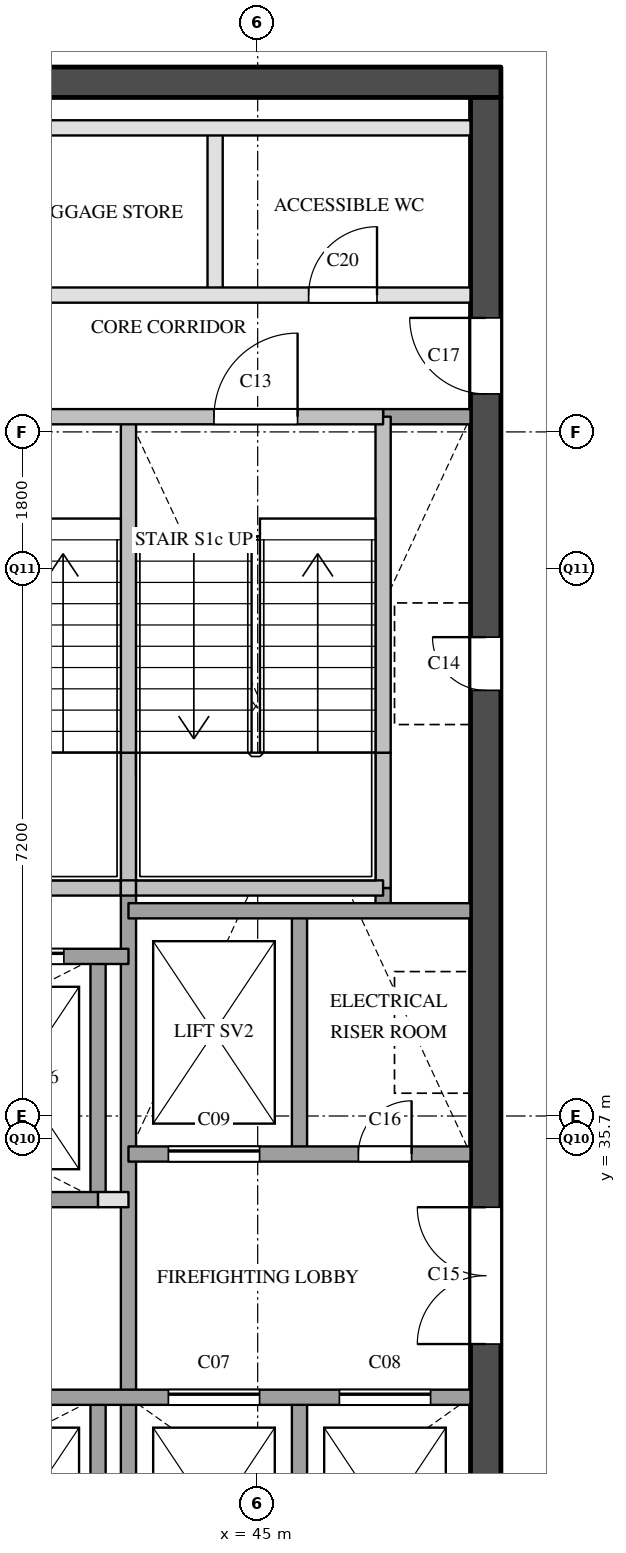
"""IFC4 building model, lengths in metres.
Left out: names, types, materials, properties, quantities, classifications, styles, units other than length and angle.
Written with IfcOpenShell. Run it as: python <this file> out.ifc"""

import sys

from ifc_helpers import new_model, si_unit, direction, frame, frame_2d, origin, place, context, subcontext, project, spatial, rectangle, extrude, element, fill, save


model = new_model("IFC4")
c1 = context("Model", 3, precision=1e-05, world=origin(), true_north=direction((0.0, 1.0)))
c2 = subcontext(c1, "Body", "Model", "MODEL_VIEW")
j1 = project(units=[si_unit("LENGTHUNIT", "METRE"), si_unit("PLANEANGLEUNIT", "RADIAN")], contexts=[c1])
p1 = place(None, origin())
s1 = spatial("IfcSite", under=j1, at=p1, CompositionType="ELEMENT")
p2 = place(p1, origin())
s2 = spatial("IfcBuilding", under=s1, at=p2, CompositionType="ELEMENT")
p3 = place(p2, frame((0.0, 0.0, 226.7)))
s3 = spatial("IfcBuildingStorey", under=s2, at=p3, CompositionType="ELEMENT", Elevation=226.7)
p4 = place(p3, frame((36.2, 49.6, 0.0), z_axis=(0.0, 0.0, 1.0), x_axis=(1.0, 0.0, 0.0)))
e1 = element("IfcWall", 1, at=p4, inside=s3, PredefinedType="SHEAR", context=c2, shape_type="SweptSolid", body=[
    extrude(rectangle(XDim=12.0, YDim=0.4, at=frame_2d((6.0, 0.0))), origin(), (0.0, 0.0, 1.0), 3.5),
])
p5 = place(p3, frame((48.0, 29.1, 0.0), z_axis=(0.0, 0.0, 1.0), x_axis=(0.0, 1.0, 0.0)))
e2 = element("IfcWall", 2, at=p5, inside=s3, PredefinedType="SHEAR", context=c2, shape_type="SweptSolid", body=[
    extrude(rectangle(XDim=20.3, YDim=0.4, at=frame_2d((10.15, 0.0))), origin(), (0.0, 0.0, 1.0), 3.5),
])
p6 = place(p5, frame((12.5, 0.0, 0.0)))
e3 = element("IfcOpeningElement", 3, at=p6, cuts=e2, PredefinedType="OPENING", context=c2, shape_type="SweptSolid", body=[
    extrude(rectangle(XDim=0.7, YDim=2.1, at=frame_2d((0.35, 1.05))), frame((0.0, 0.21, 0.0), z_axis=(0.0, -1.0, 0.0), x_axis=(1.0, 0.0, 0.0)), (0.0, 0.0, 1.0), 0.42),
])
p7 = place(p5, frame((3.9, 0.0, 0.0)))
e4 = element("IfcOpeningElement", 4, at=p7, cuts=e2, PredefinedType="OPENING", context=c2, shape_type="SweptSolid", body=[
    extrude(rectangle(XDim=1.8, YDim=2.1, at=frame_2d((0.9, 1.05))), frame((0.0, 0.21, 0.0), z_axis=(0.0, -1.0, 0.0), x_axis=(1.0, 0.0, 0.0)), (0.0, 0.0, 1.0), 0.42),
])
p8 = place(p5, frame((16.4, 0.0, 0.0)))
e5 = element("IfcOpeningElement", 5, at=p8, cuts=e2, PredefinedType="OPENING", context=c2, shape_type="SweptSolid", body=[
    extrude(rectangle(XDim=1.0, YDim=2.1, at=frame_2d((0.5, 1.05))), frame((0.0, 0.21, 0.0), z_axis=(0.0, -1.0, 0.0), x_axis=(1.0, 0.0, 0.0)), (0.0, 0.0, 1.0), 0.42),
])
p9 = place(p3, frame((42.9, 29.1, 0.0), z_axis=(0.0, 0.0, 1.0), x_axis=(0.0, 1.0, 0.0)))
e6 = element("IfcWall", 6, at=p9, inside=s3, PredefinedType="SOLIDWALL", context=c2, shape_type="SweptSolid", body=[
    extrude(rectangle(XDim=3.2, YDim=0.2, at=frame_2d((1.6, 0.0))), origin(), (0.0, 0.0, 1.0), 3.5),
])
p10 = place(p3, frame((42.9, 34.9, 0.0), z_axis=(0.0, 0.0, 1.0), x_axis=(0.0, 1.0, 0.0)))
e7 = element("IfcWall", 7, at=p10, inside=s3, PredefinedType="SOLIDWALL", context=c2, shape_type="SweptSolid", body=[
    extrude(rectangle(XDim=3.2, YDim=0.2, at=frame_2d((1.6, 0.0))), origin(), (0.0, 0.0, 1.0), 3.5),
])
p11 = place(p3, frame((43.3, 29.1, 0.0), z_axis=(0.0, 0.0, 1.0), x_axis=(0.0, 1.0, 0.0)))
e8 = element("IfcWall", 8, at=p11, inside=s3, PredefinedType="SOLIDWALL", context=c2, shape_type="SweptSolid", body=[
    extrude(rectangle(XDim=9.9, YDim=0.2, at=frame_2d((4.95, 0.0))), origin(), (0.0, 0.0, 1.0), 3.5),
])
p12 = place(p3, frame((43.3, 39.0, 0.0), z_axis=(0.0, 0.0, 1.0), x_axis=(0.0, 1.0, 0.0)))
e9 = element("IfcWall", 9, at=p12, inside=s3, PredefinedType="SOLIDWALL", context=c2, shape_type="SweptSolid", body=[
    extrude(rectangle(XDim=1.78, YDim=0.2, at=frame_2d((0.89, 0.0))), origin(), (0.0, 0.0, 1.0), 3.5),
])
p13 = place(p3, frame((43.3, 40.78, 0.0), z_axis=(0.0, 0.0, 1.0), x_axis=(0.0, 1.0, 0.0)))
e10 = element("IfcWall", 10, at=p13, inside=s3, PredefinedType="SOLIDWALL", context=c2, shape_type="SweptSolid", body=[
    extrude(rectangle(XDim=4.42, YDim=0.2, at=frame_2d((2.21, 0.0))), origin(), (0.0, 0.0, 1.0), 3.5),
])
p14 = place(p3, frame((44.44, 46.8, 0.0), z_axis=(0.0, 0.0, 1.0), x_axis=(0.0, 1.0, 0.0)))
e11 = element("IfcWall", 11, at=p14, inside=s3, PredefinedType="PARTITIONING", context=c2, shape_type="SweptSolid", body=[
    extrude(rectangle(XDim=2.2, YDim=0.2, at=frame_2d((1.1, 0.0))), origin(), (0.0, 0.0, 1.0), 3.5),
])
for number, where, z_axis, x_axis in (
    (12, (45.55, 29.1, 0.0), (0.0, 0.0, 1.0), (0.0, 1.0, 0.0)),
    (13, (45.55, 35.5, 0.0), (0.0, 0.0, 1.0), (0.0, 1.0, 0.0)),
):
    element("IfcWall", number, at=place(p3, frame(where, z_axis=z_axis, x_axis=x_axis)), inside=s3, PredefinedType="SOLIDWALL", context=c2, shape_type="SweptSolid", body=[
        extrude(rectangle(XDim=3.2, YDim=0.2, at=frame_2d((1.6, 0.0))), origin(), (0.0, 0.0, 1.0), 3.5),
    ])
p15 = place(p3, frame((46.65, 38.7, 0.0), z_axis=(0.0, 0.0, 1.0), x_axis=(0.0, 1.0, 0.0)))
e14 = element("IfcWall", 14, at=p15, inside=s3, PredefinedType="SOLIDWALL", context=c2, shape_type="SweptSolid", body=[
    extrude(rectangle(XDim=0.3, YDim=0.2, at=frame_2d((0.15, 0.0))), origin(), (0.0, 0.0, 1.0), 3.5),
])
p16 = place(p3, frame((46.65, 39.0, 0.0), z_axis=(0.0, 0.0, 1.0), x_axis=(0.0, 1.0, 0.0)))
e15 = element("IfcWall", 15, at=p16, inside=s3, PredefinedType="SOLIDWALL", context=c2, shape_type="SweptSolid", body=[
    extrude(rectangle(XDim=1.78, YDim=0.2, at=frame_2d((0.89, 0.0))), origin(), (0.0, 0.0, 1.0), 3.5),
])
p17 = place(p3, frame((46.65, 40.78, 0.0), z_axis=(0.0, 0.0, 1.0), x_axis=(0.0, 1.0, 0.0)))
e16 = element("IfcWall", 16, at=p17, inside=s3, PredefinedType="SOLIDWALL", context=c2, shape_type="SweptSolid", body=[
    extrude(rectangle(XDim=4.42, YDim=0.2, at=frame_2d((2.21, 0.0))), origin(), (0.0, 0.0, 1.0), 3.5),
])
p18 = place(p3, frame((36.6, 32.3, 0.0), z_axis=(0.0, 0.0, 1.0), x_axis=(1.0, 0.0, 0.0)))
e17 = element("IfcWall", 17, at=p18, inside=s3, PredefinedType="SOLIDWALL", context=c2, shape_type="SweptSolid", body=[
    extrude(rectangle(XDim=11.2, YDim=0.2, at=frame_2d((5.6, 0.0))), origin(), (0.0, 0.0, 1.0), 3.5),
])
p19 = place(p18, frame((7.225, 0.0, 0.0)))
e18 = element("IfcOpeningElement", 18, at=p19, cuts=e17, PredefinedType="OPENING", context=c2, shape_type="SweptSolid", body=[
    extrude(rectangle(XDim=1.2, YDim=2.1, at=frame_2d((0.6, 1.05))), frame((0.0, 0.11, 0.0), z_axis=(0.0, -1.0, 0.0), x_axis=(1.0, 0.0, 0.0)), (0.0, 0.0, 1.0), 0.22),
])
p20 = place(p18, frame((9.475, 0.0, 0.0)))
e19 = element("IfcOpeningElement", 19, at=p20, cuts=e17, PredefinedType="OPENING", context=c2, shape_type="SweptSolid", body=[
    extrude(rectangle(XDim=1.2, YDim=2.1, at=frame_2d((0.6, 1.05))), frame((0.0, 0.11, 0.0), z_axis=(0.0, -1.0, 0.0), x_axis=(1.0, 0.0, 0.0)), (0.0, 0.0, 1.0), 0.22),
])
p21 = place(p3, frame((42.9, 34.9, 0.0), z_axis=(0.0, 0.0, 1.0), x_axis=(1.0, 0.0, 0.0)))
e20 = element("IfcWall", 20, at=p21, inside=s3, PredefinedType="PARTITIONING", context=c2, shape_type="SweptSolid", body=[
    extrude(rectangle(XDim=0.4, YDim=0.2, at=frame_2d((0.2, 0.0))), origin(), (0.0, 0.0, 1.0), 3.5),
])
p22 = place(p3, frame((36.6, 34.9, 0.0), z_axis=(0.0, 0.0, 1.0), x_axis=(1.0, 0.0, 0.0)))
e21 = element("IfcWall", 21, at=p22, inside=s3, PredefinedType="SOLIDWALL", context=c2, shape_type="SweptSolid", body=[
    extrude(rectangle(XDim=6.3, YDim=0.2, at=frame_2d((3.15, 0.0))), origin(), (0.0, 0.0, 1.0), 3.5),
])
p23 = place(p3, frame((43.3, 35.5, 0.0), z_axis=(0.0, 0.0, 1.0), x_axis=(1.0, 0.0, 0.0)))
e22 = element("IfcWall", 22, at=p23, inside=s3, PredefinedType="SOLIDWALL", context=c2, shape_type="SweptSolid", body=[
    extrude(rectangle(XDim=4.5, YDim=0.2, at=frame_2d((2.25, 0.0))), origin(), (0.0, 0.0, 1.0), 3.5),
])
p24 = place(p23, frame((0.525, 0.0, 0.0)))
e23 = element("IfcOpeningElement", 23, at=p24, cuts=e22, PredefinedType="OPENING", context=c2, shape_type="SweptSolid", body=[
    extrude(rectangle(XDim=1.2, YDim=2.1, at=frame_2d((0.6, 1.05))), frame((0.0, 0.11, 0.0), z_axis=(0.0, -1.0, 0.0), x_axis=(1.0, 0.0, 0.0)), (0.0, 0.0, 1.0), 0.22),
])
p25 = place(p23, frame((3.025, 0.0, 0.0)))
e24 = element("IfcOpeningElement", 24, at=p25, cuts=e22, PredefinedType="OPENING", context=c2, shape_type="SweptSolid", body=[
    extrude(rectangle(XDim=0.7, YDim=2.1, at=frame_2d((0.35, 1.05))), frame((0.0, 0.11, 0.0), z_axis=(0.0, -1.0, 0.0), x_axis=(1.0, 0.0, 0.0)), (0.0, 0.0, 1.0), 0.22),
])
p26 = place(p3, frame((36.6, 38.1, 0.0), z_axis=(0.0, 0.0, 1.0), x_axis=(1.0, 0.0, 0.0)))
e25 = element("IfcWall", 25, at=p26, inside=s3, PredefinedType="SOLIDWALL", context=c2, shape_type="SweptSolid", body=[
    extrude(rectangle(XDim=6.7, YDim=0.2, at=frame_2d((3.35, 0.0))), origin(), (0.0, 0.0, 1.0), 3.5),
])
p27 = place(p26, frame((0.45, 0.0, 0.0)))
e26 = element("IfcOpeningElement", 26, at=p27, cuts=e25, PredefinedType="OPENING", context=c2, shape_type="SweptSolid", body=[
    extrude(rectangle(XDim=1.2, YDim=2.1, at=frame_2d((0.6, 1.05))), frame((0.0, 0.11, 0.0), z_axis=(0.0, -1.0, 0.0), x_axis=(1.0, 0.0, 0.0)), (0.0, 0.0, 1.0), 0.22),
])
p28 = place(p26, frame((2.55, 0.0, 0.0)))
e27 = element("IfcOpeningElement", 27, at=p28, cuts=e25, PredefinedType="OPENING", context=c2, shape_type="SweptSolid", body=[
    extrude(rectangle(XDim=1.2, YDim=2.1, at=frame_2d((0.6, 1.05))), frame((0.0, 0.11, 0.0), z_axis=(0.0, -1.0, 0.0), x_axis=(1.0, 0.0, 0.0)), (0.0, 0.0, 1.0), 0.22),
])
p29 = place(p26, frame((4.65, 0.0, 0.0)))
e28 = element("IfcOpeningElement", 28, at=p29, cuts=e25, PredefinedType="OPENING", context=c2, shape_type="SweptSolid", body=[
    extrude(rectangle(XDim=1.2, YDim=2.1, at=frame_2d((0.6, 1.05))), frame((0.0, 0.11, 0.0), z_axis=(0.0, -1.0, 0.0), x_axis=(1.0, 0.0, 0.0)), (0.0, 0.0, 1.0), 0.22),
])
p30 = place(p3, frame((43.3, 38.7, 0.0), z_axis=(0.0, 0.0, 1.0), x_axis=(1.0, 0.0, 0.0)))
e29 = element("IfcWall", 29, at=p30, inside=s3, PredefinedType="SOLIDWALL", context=c2, shape_type="SweptSolid", body=[
    extrude(rectangle(XDim=4.5, YDim=0.2, at=frame_2d((2.25, 0.0))), origin(), (0.0, 0.0, 1.0), 3.5),
])
p31 = place(p3, frame((40.05, 39.0, 0.0), z_axis=(0.0, 0.0, 1.0), x_axis=(1.0, 0.0, 0.0)))
e30 = element("IfcWall", 30, at=p31, inside=s3, PredefinedType="SOLIDWALL", context=c2, shape_type="SweptSolid", body=[
    extrude(rectangle(XDim=3.15, YDim=0.2, at=frame_2d((1.575, 0.0))), origin(), (0.0, 0.0, 1.0), 3.5),
])
p32 = place(p3, frame((43.2, 39.0, 0.0), z_axis=(0.0, 0.0, 1.0), x_axis=(1.0, 0.0, 0.0)))
e31 = element("IfcWall", 31, at=p32, inside=s3, PredefinedType="SOLIDWALL", context=c2, shape_type="SweptSolid", body=[
    extrude(rectangle(XDim=0.2, YDim=0.2, at=frame_2d((0.1, 0.0))), origin(), (0.0, 0.0, 1.0), 3.5),
])
p33 = place(p3, frame((43.4, 39.0, 0.0), z_axis=(0.0, 0.0, 1.0), x_axis=(1.0, 0.0, 0.0)))
e32 = element("IfcWall", 32, at=p33, inside=s3, PredefinedType="SOLIDWALL", context=c2, shape_type="SweptSolid", body=[
    extrude(rectangle(XDim=3.25, YDim=0.2, at=frame_2d((1.625, 0.0))), origin(), (0.0, 0.0, 1.0), 3.5),
])
p34 = place(p3, frame((46.65, 45.2, 0.0), z_axis=(0.0, 0.0, 1.0), x_axis=(1.0, 0.0, 0.0)))
e33 = element("IfcWall", 33, at=p34, inside=s3, PredefinedType="SOLIDWALL", context=c2, shape_type="SweptSolid", body=[
    extrude(rectangle(XDim=1.15, YDim=0.2, at=frame_2d((0.575, 0.0))), origin(), (0.0, 0.0, 1.0), 3.5),
])
p35 = place(p3, frame((36.6, 45.2, 0.0), z_axis=(0.0, 0.0, 1.0), x_axis=(1.0, 0.0, 0.0)))
e34 = element("IfcWall", 34, at=p35, inside=s3, PredefinedType="SOLIDWALL", context=c2, shape_type="SweptSolid", body=[
    extrude(rectangle(XDim=10.05, YDim=0.2, at=frame_2d((5.025, 0.0))), origin(), (0.0, 0.0, 1.0), 3.5),
])
p36 = place(p35, frame((1.125, 0.0, 0.0)))
e35 = element("IfcOpeningElement", 35, at=p36, cuts=e34, PredefinedType="OPENING", context=c2, shape_type="SweptSolid", body=[
    extrude(rectangle(XDim=1.1, YDim=2.1, at=frame_2d((0.55, 1.05))), frame((0.0, 0.11, 0.0), z_axis=(0.0, -1.0, 0.0), x_axis=(1.0, 0.0, 0.0)), (0.0, 0.0, 1.0), 0.22),
])
p37 = place(p35, frame((4.475, 0.0, 0.0)))
e36 = element("IfcOpeningElement", 36, at=p37, cuts=e34, PredefinedType="OPENING", context=c2, shape_type="SweptSolid", body=[
    extrude(rectangle(XDim=1.1, YDim=2.1, at=frame_2d((0.55, 1.05))), frame((0.0, 0.11, 0.0), z_axis=(0.0, -1.0, 0.0), x_axis=(1.0, 0.0, 0.0)), (0.0, 0.0, 1.0), 0.22),
])
p38 = place(p35, frame((7.825, 0.0, 0.0)))
e37 = element("IfcOpeningElement", 37, at=p38, cuts=e34, PredefinedType="OPENING", context=c2, shape_type="SweptSolid", body=[
    extrude(rectangle(XDim=1.1, YDim=2.1, at=frame_2d((0.55, 1.05))), frame((0.0, 0.11, 0.0), z_axis=(0.0, -1.0, 0.0), x_axis=(1.0, 0.0, 0.0)), (0.0, 0.0, 1.0), 0.22),
])
p39 = place(p3, frame((36.6, 46.8, 0.0), z_axis=(0.0, 0.0, 1.0), x_axis=(1.0, 0.0, 0.0)))
e38 = element("IfcWall", 38, at=p39, inside=s3, PredefinedType="PARTITIONING", context=c2, shape_type="SweptSolid", body=[
    extrude(rectangle(XDim=11.2, YDim=0.2, at=frame_2d((5.6, 0.0))), origin(), (0.0, 0.0, 1.0), 3.5),
])
p40 = place(p39, frame((0.67, 0.0, 0.0)))
e39 = element("IfcOpeningElement", 39, at=p40, cuts=e38, PredefinedType="OPENING", context=c2, shape_type="SweptSolid", body=[
    extrude(rectangle(XDim=0.9, YDim=2.1, at=frame_2d((0.45, 1.05))), frame((0.0, 0.11, 0.0), z_axis=(0.0, -1.0, 0.0), x_axis=(1.0, 0.0, 0.0)), (0.0, 0.0, 1.0), 0.22),
])
p41 = place(p39, frame((4.59, 0.0, 0.0)))
e40 = element("IfcOpeningElement", 40, at=p41, cuts=e38, PredefinedType="OPENING", context=c2, shape_type="SweptSolid", body=[
    extrude(rectangle(XDim=0.9, YDim=2.1, at=frame_2d((0.45, 1.05))), frame((0.0, 0.11, 0.0), z_axis=(0.0, -1.0, 0.0), x_axis=(1.0, 0.0, 0.0)), (0.0, 0.0, 1.0), 0.22),
])
p42 = place(p39, frame((9.07, 0.0, 0.0)))
e41 = element("IfcOpeningElement", 41, at=p42, cuts=e38, PredefinedType="OPENING", context=c2, shape_type="SweptSolid", body=[
    extrude(rectangle(XDim=0.9, YDim=2.1, at=frame_2d((0.45, 1.05))), frame((0.0, 0.11, 0.0), z_axis=(0.0, -1.0, 0.0), x_axis=(1.0, 0.0, 0.0)), (0.0, 0.0, 1.0), 0.22),
])
p43 = place(p3, frame((36.6, 49.0, 0.0), z_axis=(0.0, 0.0, 1.0), x_axis=(1.0, 0.0, 0.0)))
e42 = element("IfcWall", 42, at=p43, inside=s3, PredefinedType="PARTITIONING", context=c2, shape_type="SweptSolid", body=[
    extrude(rectangle(XDim=11.2, YDim=0.2, at=frame_2d((5.6, 0.0))), origin(), (0.0, 0.0, 1.0), 3.5),
])
p44 = place(p29, origin())
e43 = element("IfcDoor", 43, at=p44, inside=s3, OperationType="SLIDING_TO_LEFT", PredefinedType="DOOR", context=c2, shape_type="SweptSolid", body=[
    extrude(rectangle(XDim=1.2, YDim=2.1, at=frame_2d((0.6, 1.05))), frame((0.0, 0.025, 0.0), z_axis=(0.0, -1.0, 0.0), x_axis=(1.0, 0.0, 0.0)), (0.0, 0.0, 1.0), 0.05),
])
fill(e28, e43)
p45 = place(p19, origin())
e44 = element("IfcDoor", 44, at=p45, inside=s3, OperationType="SLIDING_TO_LEFT", PredefinedType="DOOR", context=c2, shape_type="SweptSolid", body=[
    extrude(rectangle(XDim=1.2, YDim=2.1, at=frame_2d((0.6, 1.05))), frame((0.0, 0.025, 0.0), z_axis=(0.0, -1.0, 0.0), x_axis=(1.0, 0.0, 0.0)), (0.0, 0.0, 1.0), 0.05),
])
fill(e18, e44)
p46 = place(p20, origin())
e45 = element("IfcDoor", 45, at=p46, inside=s3, OperationType="SLIDING_TO_LEFT", PredefinedType="DOOR", context=c2, shape_type="SweptSolid", body=[
    extrude(rectangle(XDim=1.2, YDim=2.1, at=frame_2d((0.6, 1.05))), frame((0.0, 0.025, 0.0), z_axis=(0.0, -1.0, 0.0), x_axis=(1.0, 0.0, 0.0)), (0.0, 0.0, 1.0), 0.05),
])
fill(e19, e45)
p47 = place(p24, origin())
e46 = element("IfcDoor", 46, at=p47, inside=s3, OperationType="SLIDING_TO_LEFT", PredefinedType="DOOR", context=c2, shape_type="SweptSolid", body=[
    extrude(rectangle(XDim=1.2, YDim=2.1, at=frame_2d((0.6, 1.05))), frame((0.0, 0.025, 0.0), z_axis=(0.0, -1.0, 0.0), x_axis=(1.0, 0.0, 0.0)), (0.0, 0.0, 1.0), 0.05),
])
fill(e23, e46)
p48 = place(p38, origin())
e47 = element("IfcDoor", 47, at=p48, inside=s3, OperationType="SINGLE_SWING_RIGHT", PredefinedType="DOOR", context=c2, shape_type="SweptSolid", body=[
    extrude(rectangle(XDim=1.1, YDim=2.1, at=frame_2d((0.55, 1.05))), frame((0.0, 0.025, 0.0), z_axis=(0.0, -1.0, 0.0), x_axis=(1.0, 0.0, 0.0)), (0.0, 0.0, 1.0), 0.05),
])
fill(e37, e47)
p49 = place(p6, origin())
e48 = element("IfcDoor", 48, at=p49, inside=s3, OperationType="SINGLE_SWING_RIGHT", PredefinedType="DOOR", context=c2, shape_type="SweptSolid", body=[
    extrude(rectangle(XDim=0.7, YDim=2.1, at=frame_2d((0.35, 1.05))), frame((0.0, 0.025, 0.0), z_axis=(0.0, -1.0, 0.0), x_axis=(1.0, 0.0, 0.0)), (0.0, 0.0, 1.0), 0.05),
])
fill(e3, e48)
p50 = place(p7, origin())
e49 = element("IfcDoor", 49, at=p50, inside=s3, OperationType="DOUBLE_DOOR_SINGLE_SWING", PredefinedType="DOOR", context=c2, shape_type="SweptSolid", body=[
    extrude(rectangle(XDim=1.8, YDim=2.1, at=frame_2d((0.9, 1.05))), frame((0.0, 0.025, 0.0), z_axis=(0.0, -1.0, 0.0), x_axis=(1.0, 0.0, 0.0)), (0.0, 0.0, 1.0), 0.05),
])
fill(e4, e49)
p51 = place(p25, origin())
e50 = element("IfcDoor", 50, at=p51, inside=s3, OperationType="SINGLE_SWING_RIGHT", PredefinedType="DOOR", context=c2, shape_type="SweptSolid", body=[
    extrude(rectangle(XDim=0.7, YDim=2.1, at=frame_2d((0.35, 1.05))), frame((0.0, 0.025, 0.0), z_axis=(0.0, -1.0, 0.0), x_axis=(1.0, 0.0, 0.0)), (0.0, 0.0, 1.0), 0.05),
])
fill(e24, e50)
p52 = place(p8, origin())
e51 = element("IfcDoor", 51, at=p52, inside=s3, OperationType="SINGLE_SWING_RIGHT", PredefinedType="DOOR", context=c2, shape_type="SweptSolid", body=[
    extrude(rectangle(XDim=1.0, YDim=2.1, at=frame_2d((0.5, 1.05))), frame((0.0, 0.025, 0.0), z_axis=(0.0, -1.0, 0.0), x_axis=(1.0, 0.0, 0.0)), (0.0, 0.0, 1.0), 0.05),
])
fill(e5, e51)
p53 = place(p42, origin())
e52 = element("IfcDoor", 52, at=p53, inside=s3, OperationType="SINGLE_SWING_RIGHT", PredefinedType="DOOR", context=c2, shape_type="SweptSolid", body=[
    extrude(rectangle(XDim=0.9, YDim=2.1, at=frame_2d((0.45, 1.05))), frame((0.0, 0.025, 0.0), z_axis=(0.0, -1.0, 0.0), x_axis=(1.0, 0.0, 0.0)), (0.0, 0.0, 1.0), 0.05),
])
fill(e41, e52)
save(model, sys.argv[1])
